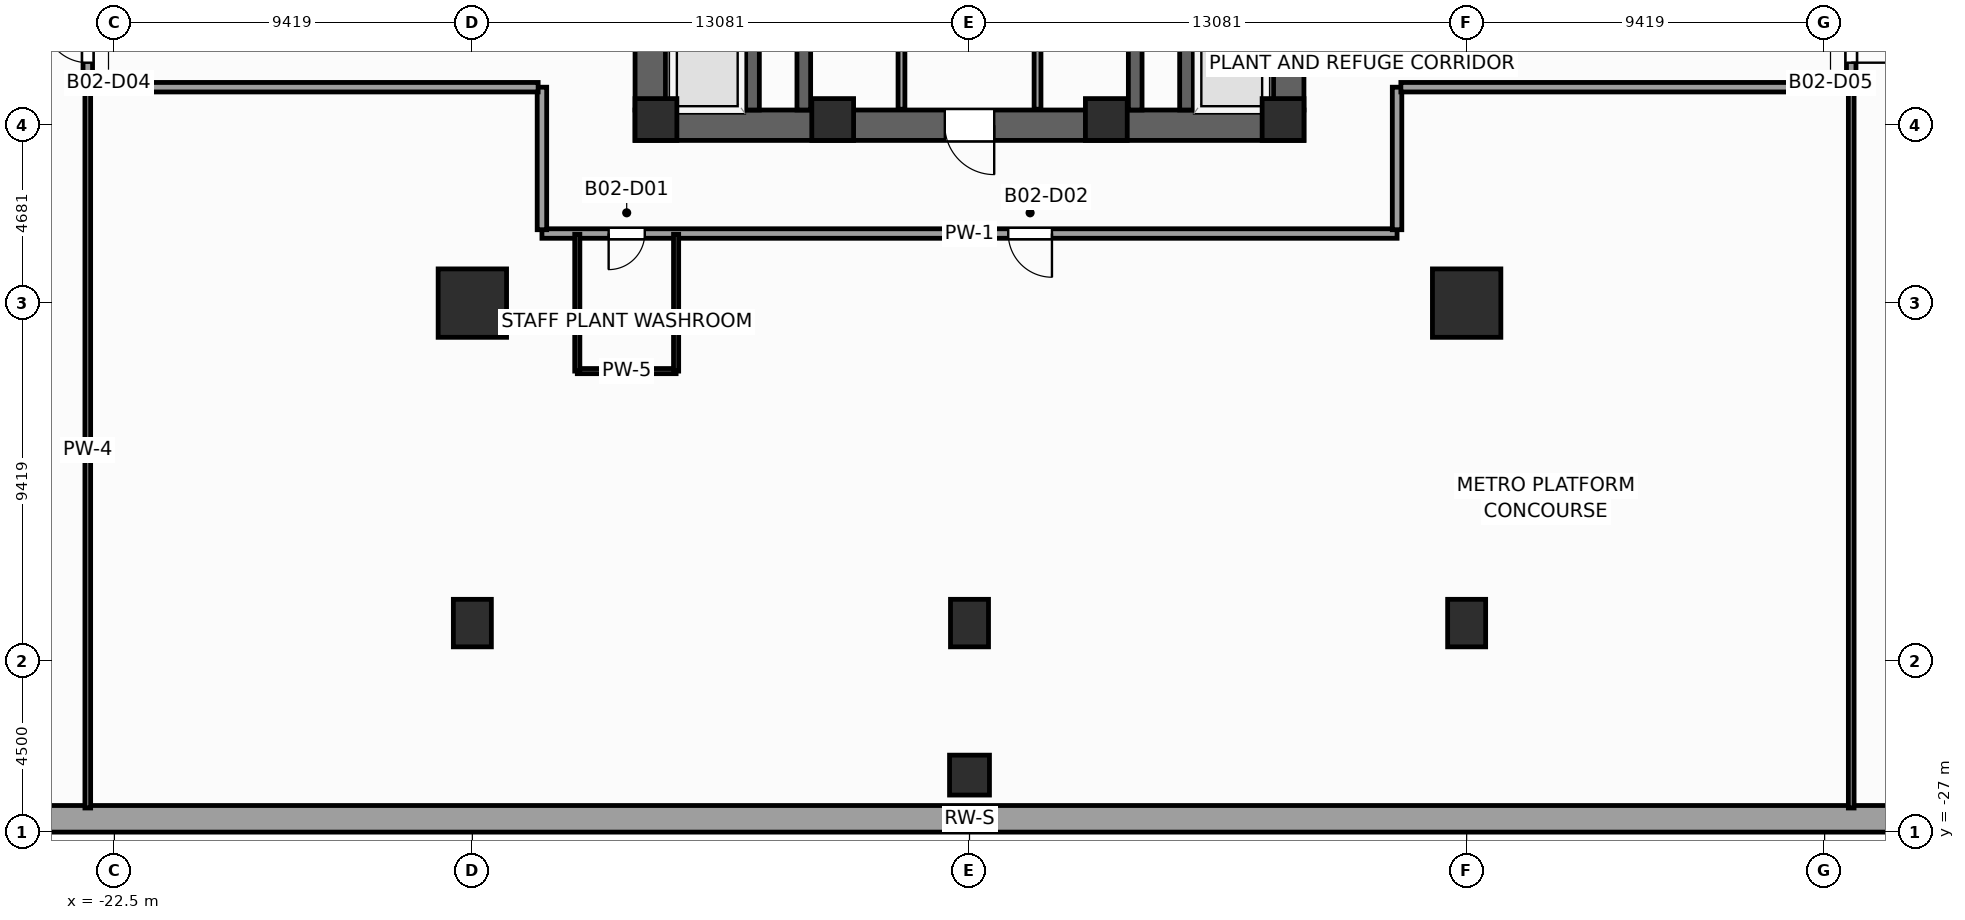
"""IFC4 building model, lengths in metres.
Left out: names, types, materials, properties, quantities, classifications, styles, units other than length and angle.
Written with IfcOpenShell. Run it as: python <this file> out.ifc"""

import sys

from ifc_helpers import new_model, si_unit, direction, frame, frame_2d, origin, origin_2d, place, context, subcontext, project, spatial, rectangle, extrude, source, transform, mapped, element, fill, save


model = new_model("IFC4")
c1 = context("Model", 3, precision=1e-05, world=origin(), true_north=direction((0.0, 1.0)))
c2 = subcontext(c1, "Body", "Model", "MODEL_VIEW")
j1 = project(units=[si_unit("LENGTHUNIT", "METRE"), si_unit("PLANEANGLEUNIT", "RADIAN")], contexts=[c1])
p1 = place(None, origin())
s1 = spatial("IfcSite", under=j1, at=p1, CompositionType="ELEMENT")
p2 = place(p1, origin())
s2 = spatial("IfcBuilding", under=s1, at=p2, CompositionType="ELEMENT")
p3 = place(p2, frame((0.0, 0.0, -9.0)))
s3 = spatial("IfcBuildingStorey", under=s2, at=p3, CompositionType="ELEMENT", Elevation=-9.0)
p4 = place(p3, frame((-8.8, -8.4, 0.0), z_axis=(0.0, 0.0, 1.0), x_axis=(1.0, 0.0, 0.0)))
e1 = element("IfcWall", 1, at=p4, inside=s3, PredefinedType="SHEAR", context=c2, shape_type="SweptSolid", body=[
    extrude(rectangle(XDim=17.6, YDim=0.8, at=frame_2d((8.8, 0.0))), origin(), (0.0, 0.0, 1.0), 4.5),
])
p5 = place(p4, frame((8.15, 0.0, 0.0)))
e2 = element("IfcOpeningElement", 2, at=p5, cuts=e1, PredefinedType="OPENING", context=c2, shape_type="SweptSolid", body=[
    extrude(rectangle(XDim=1.3, YDim=2.2, at=frame_2d((0.65, 1.1))), frame((0.0, 0.41, 0.0), z_axis=(0.0, -1.0, 0.0), x_axis=(1.0, 0.0, 0.0)), (0.0, 0.0, 1.0), 0.82),
])
p6 = place(p3, frame((-8.4, -8.0, 0.0), z_axis=(0.0, 0.0, 1.0), x_axis=(0.0, 1.0, 0.0)))
e3 = element("IfcWall", 3, at=p6, inside=s3, PredefinedType="SHEAR", context=c2, shape_type="SweptSolid", body=[
    extrude(rectangle(XDim=16.0, YDim=0.8, at=frame_2d((8.0, 0.0))), origin(), (0.0, 0.0, 1.0), 4.5),
])
p7 = place(p6, frame((4.69, 0.0, 0.0)))
e4 = element("IfcOpeningElement", 4, at=p7, cuts=e3, PredefinedType="OPENING", context=c2, shape_type="SweptSolid", body=[
    extrude(rectangle(XDim=1.3, YDim=2.2, at=frame_2d((0.65, 1.1))), frame((0.0, 0.41, 0.0), z_axis=(0.0, -1.0, 0.0), x_axis=(1.0, 0.0, 0.0)), (0.0, 0.0, 1.0), 0.82),
])
p8 = place(p3, frame((8.4, -8.0, 0.0), z_axis=(0.0, 0.0, 1.0), x_axis=(0.0, 1.0, 0.0)))
e5 = element("IfcWall", 5, at=p8, inside=s3, PredefinedType="SHEAR", context=c2, shape_type="SweptSolid", body=[
    extrude(rectangle(XDim=16.0, YDim=0.8, at=frame_2d((8.0, 0.0))), origin(), (0.0, 0.0, 1.0), 4.5),
])
p9 = place(p8, frame((4.69, 0.0, 0.0)))
e6 = element("IfcOpeningElement", 6, at=p9, cuts=e5, PredefinedType="OPENING", context=c2, shape_type="SweptSolid", body=[
    extrude(rectangle(XDim=1.3, YDim=2.2, at=frame_2d((0.65, 1.1))), frame((0.0, 0.41, 0.0), z_axis=(0.0, -1.0, 0.0), x_axis=(1.0, 0.0, 0.0)), (0.0, 0.0, 1.0), 0.82),
])
for number, where, z_axis, x_axis in (
    (7, (-4.36, -8.0, 0.0), (0.0, 0.0, 1.0), (0.0, 1.0, 0.0)),
    (8, (4.36, -8.0, 0.0), (0.0, 0.0, 1.0), (0.0, 1.0, 0.0)),
):
    element("IfcWall", number, at=place(p3, frame(where, z_axis=z_axis, x_axis=x_axis)), inside=s3, PredefinedType="SHEAR", context=c2, shape_type="SweptSolid", body=[
        extrude(rectangle(XDim=16.0, YDim=0.36, at=frame_2d((8.0, 0.0))), origin(), (0.0, 0.0, 1.0), 4.5),
    ])
for number, where, z_axis, x_axis in (
    (9, (-5.71, -8.0, 0.0), (0.0, 0.0, 1.0), (0.0, 1.0, 0.0)),
    (10, (5.71, -8.0, 0.0), (0.0, 0.0, 1.0), (0.0, 1.0, 0.0)),
):
    element("IfcWall", number, at=place(p3, frame(where, z_axis=z_axis, x_axis=x_axis)), inside=s3, PredefinedType="SHEAR", context=c2, shape_type="SweptSolid", body=[
        extrude(rectangle(XDim=2.54, YDim=0.36, at=frame_2d((1.27, 0.0))), origin(), (0.0, 0.0, 1.0), 4.5),
    ])
p10 = place(p3, frame((-42.0, -26.65, 0.0), z_axis=(0.0, 0.0, 1.0), x_axis=(1.0, 0.0, 0.0)))
e11 = element("IfcWall", 11, at=p10, inside=s3, PredefinedType="USERDEFINED", context=c2, shape_type="SweptSolid", body=[
    extrude(rectangle(XDim=84.0, YDim=0.7, at=frame_2d((42.0, 0.0))), origin(), (0.0, 0.0, 1.0), 4.5),
])
m1 = source(origin(), c2, "Body", "SweptSolid", [
    extrude(rectangle(XDim=1.1, YDim=1.1, at=origin_2d()), origin(), (0.0, 0.0, 1.0), 4.5),
])
for number, where, z_axis, x_axis in (
    (12, (-8.25, -8.25, 0.0), (0.0, 0.0, 1.0), (1.0, 0.0, 0.0)),
    (13, (8.25, -8.25, 0.0), (0.0, 0.0, 1.0), (1.0, 0.0, 0.0)),
    (14, (-3.6, -8.25, 0.0), (0.0, 0.0, 1.0), (1.0, 0.0, 0.0)),
    (15, (3.6, -8.25, 0.0), (0.0, 0.0, 1.0), (1.0, 0.0, 0.0)),
):
    element("IfcColumn", number, at=place(p3, frame(where, z_axis=z_axis, x_axis=x_axis)), inside=s3, PredefinedType="PILASTER", context=c2, shape_type="MappedRepresentation", body=[
        mapped(m1, transform((0.0, 0.0, 0.0), scale=1.0)),
    ])
m2 = source(origin(), c2, "Body", "SweptSolid", [
    extrude(rectangle(XDim=1.8, YDim=1.8, at=origin_2d()), origin(), (0.0, 0.0, 1.0), 4.5),
])
for number, where, z_axis, x_axis in (
    (16, (-13.081, -13.081, 0.0), (0.0, 0.0, 1.0), (1.0, 0.0, 0.0)),
    (17, (13.081, -13.081, 0.0), (0.0, 0.0, 1.0), (1.0, 0.0, 0.0)),
):
    element("IfcColumn", number, at=place(p3, frame(where, z_axis=z_axis, x_axis=x_axis)), inside=s3, PredefinedType="COLUMN", context=c2, shape_type="MappedRepresentation", body=[
        mapped(m2, transform((0.0, 0.0, 0.0), scale=1.0)),
    ])
m3 = source(origin(), c2, "Body", "SweptSolid", [
    extrude(rectangle(XDim=1.0, YDim=1.25, at=origin_2d()), origin(), (0.0, 0.0, 1.0), 4.5),
])
for number, where, z_axis, x_axis in (
    (18, (-13.081, -21.5, 0.0), (0.0, 0.0, 1.0), (1.0, 0.0, 0.0)),
    (19, (0.0, -21.5, 0.0), (0.0, 0.0, 1.0), (1.0, 0.0, 0.0)),
    (20, (13.081, -21.5, 0.0), (0.0, 0.0, 1.0), (1.0, 0.0, 0.0)),
):
    element("IfcColumn", number, at=place(p3, frame(where, z_axis=z_axis, x_axis=x_axis)), inside=s3, PredefinedType="COLUMN", context=c2, shape_type="MappedRepresentation", body=[
        mapped(m3, transform((0.0, 0.0, 0.0), scale=1.0)),
    ])
m4 = source(origin(), c2, "Body", "SweptSolid", [
    extrude(rectangle(XDim=1.05, YDim=1.05, at=origin_2d()), origin(), (0.0, 0.0, 1.0), 4.5),
])
p11 = place(p3, frame((0.0, -25.5, 0.0), z_axis=(0.0, 0.0, 1.0), x_axis=(1.0, 0.0, 0.0)))
e21 = element("IfcColumn", 21, at=p11, inside=s3, PredefinedType="COLUMN", context=c2, shape_type="MappedRepresentation", body=[
    mapped(m4, transform((0.0, 0.0, 0.0), scale=1.0)),
])
for number, where, z_axis, x_axis in (
    (22, (-1.79, -7.98, 0.0), (0.0, 0.0, 1.0), (0.0, 1.0, 0.0)),
    (23, (1.79, -7.98, 0.0), (0.0, 0.0, 1.0), (0.0, 1.0, 0.0)),
):
    element("IfcWall", number, at=place(p3, frame(where, z_axis=z_axis, x_axis=x_axis)), inside=s3, PredefinedType="PARTITIONING", context=c2, shape_type="SweptSolid", body=[
        extrude(rectangle(XDim=12.38, YDim=0.18, at=frame_2d((6.19, 0.0))), origin(), (0.0, 0.0, 1.0), 4.18),
    ])
p12 = place(p3, frame((-11.25, -11.25, 0.0), z_axis=(0.0, 0.0, 1.0), x_axis=(1.0, 0.0, 0.0)))
e24 = element("IfcWall", 24, at=p12, inside=s3, PredefinedType="PARTITIONING", context=c2, shape_type="SweptSolid", body=[
    extrude(rectangle(XDim=22.5, YDim=0.25, at=frame_2d((11.25, 0.0))), origin(), (0.0, 0.0, 1.0), 4.18),
])
p13 = place(p12, frame((1.755, 0.0, 0.0)))
e25 = element("IfcOpeningElement", 25, at=p13, cuts=e24, PredefinedType="OPENING", context=c2, shape_type="SweptSolid", body=[
    extrude(rectangle(XDim=0.95, YDim=2.1, at=frame_2d((0.475, 1.05))), frame((0.0, 0.135, 0.0), z_axis=(0.0, -1.0, 0.0), x_axis=(1.0, 0.0, 0.0)), (0.0, 0.0, 1.0), 0.27),
])
p14 = place(p12, frame((12.27, 0.0, 0.0)))
e26 = element("IfcOpeningElement", 26, at=p14, cuts=e24, PredefinedType="OPENING", context=c2, shape_type="SweptSolid", body=[
    extrude(rectangle(XDim=1.15, YDim=2.25, at=frame_2d((0.575, 1.125))), frame((0.0, 0.135, 0.0), z_axis=(0.0, -1.0, 0.0), x_axis=(1.0, 0.0, 0.0)), (0.0, 0.0, 1.0), 0.27),
])
for number, where, z_axis, x_axis in (
    (27, (-11.25, -11.15, 0.0), (0.0, 0.0, 1.0), (0.0, 1.0, 0.0)),
    (28, (11.25, -11.15, 0.0), (0.0, 0.0, 1.0), (0.0, 1.0, 0.0)),
):
    element("IfcWall", number, at=place(p3, frame(where, z_axis=z_axis, x_axis=x_axis)), inside=s3, PredefinedType="PARTITIONING", context=c2, shape_type="SweptSolid", body=[
        extrude(rectangle(XDim=3.75, YDim=0.25, at=frame_2d((1.875, 0.0))), origin(), (0.0, 0.0, 1.0), 4.18),
    ])
for number, where, z_axis, x_axis in (
    (29, (-23.2, -7.4, 0.0), (0.0, 0.0, 1.0), (1.0, 0.0, 0.0)),
    (30, (11.35, -7.4, 0.0), (0.0, 0.0, 1.0), (1.0, 0.0, 0.0)),
):
    element("IfcWall", number, at=place(p3, frame(where, z_axis=z_axis, x_axis=x_axis)), inside=s3, PredefinedType="PARTITIONING", context=c2, shape_type="SweptSolid", body=[
        extrude(rectangle(XDim=11.85, YDim=0.25, at=frame_2d((5.925, 0.0))), origin(), (0.0, 0.0, 1.0), 4.18),
    ])
p15 = place(p3, frame((-23.2, -7.4, 0.0), z_axis=(0.0, 0.0, 1.0), x_axis=(0.0, 1.0, 0.0)))
e31 = element("IfcWall", 31, at=p15, inside=s3, PredefinedType="PARTITIONING", context=c2, shape_type="SweptSolid", body=[
    extrude(rectangle(XDim=2.44, YDim=0.25, at=frame_2d((1.22, 0.0))), origin(), (0.0, 0.0, 1.0), 4.18),
])
p16 = place(p15, frame((0.645, 0.0, 0.0)))
e32 = element("IfcOpeningElement", 32, at=p16, cuts=e31, PredefinedType="OPENING", context=c2, shape_type="SweptSolid", body=[
    extrude(rectangle(XDim=1.15, YDim=2.25, at=frame_2d((0.575, 1.125))), frame((0.0, 0.135, 0.0), z_axis=(0.0, -1.0, 0.0), x_axis=(1.0, 0.0, 0.0)), (0.0, 0.0, 1.0), 0.27),
])
p17 = place(p3, frame((23.2, -7.4, 0.0), z_axis=(0.0, 0.0, 1.0), x_axis=(0.0, 1.0, 0.0)))
e33 = element("IfcWall", 33, at=p17, inside=s3, PredefinedType="PARTITIONING", context=c2, shape_type="SweptSolid", body=[
    extrude(rectangle(XDim=2.44, YDim=0.25, at=frame_2d((1.22, 0.0))), origin(), (0.0, 0.0, 1.0), 4.18),
])
p18 = place(p17, frame((0.645, 0.0, 0.0)))
e34 = element("IfcOpeningElement", 34, at=p18, cuts=e33, PredefinedType="OPENING", context=c2, shape_type="SweptSolid", body=[
    extrude(rectangle(XDim=1.15, YDim=2.25, at=frame_2d((0.575, 1.125))), frame((0.0, 0.135, 0.0), z_axis=(0.0, -1.0, 0.0), x_axis=(1.0, 0.0, 0.0)), (0.0, 0.0, 1.0), 0.27),
])
for number, where, z_axis, x_axis in (
    (35, (-23.2, -26.365, 0.0), (0.0, 0.0, 1.0), (0.0, 1.0, 0.0)),
    (36, (23.2, -26.365, 0.0), (0.0, 0.0, 1.0), (0.0, 1.0, 0.0)),
):
    element("IfcWall", number, at=place(p3, frame(where, z_axis=z_axis, x_axis=x_axis)), inside=s3, PredefinedType="PARTITIONING", context=c2, shape_type="SweptSolid", body=[
        extrude(rectangle(XDim=18.835, YDim=0.15, at=frame_2d((9.417, 0.0))), origin(), (0.0, 0.0, 1.0), 4.18),
    ])
p19 = place(p3, frame((-10.32, -14.87, 0.0), z_axis=(0.0, 0.0, 1.0), x_axis=(1.0, 0.0, 0.0)))
e37 = element("IfcWall", 37, at=p19, inside=s3, PredefinedType="PARTITIONING", context=c2, shape_type="SweptSolid", body=[
    extrude(rectangle(XDim=2.6, YDim=0.135, at=frame_2d((1.3, 0.0))), origin(), (0.0, 0.0, 1.0), 4.18),
])
for number, where, z_axis, x_axis in (
    (38, (-7.72, -14.87, 0.0), (0.0, 0.0, 1.0), (0.0, 1.0, 0.0)),
    (39, (-10.32, -14.87, 0.0), (0.0, 0.0, 1.0), (0.0, 1.0, 0.0)),
):
    element("IfcWall", number, at=place(p3, frame(where, z_axis=z_axis, x_axis=x_axis)), inside=s3, PredefinedType="PARTITIONING", context=c2, shape_type="SweptSolid", body=[
        extrude(rectangle(XDim=3.6, YDim=0.135, at=frame_2d((1.8, 0.0))), origin(), (0.0, 0.0, 1.0), 4.18),
    ])
m5 = source(origin(), c2, "Body", "SweptSolid", [
    extrude(rectangle(XDim=1.3, YDim=2.2, at=frame_2d((0.65, 1.1))), frame((0.0, 0.025, 0.0), z_axis=(0.0, -1.0, 0.0), x_axis=(1.0, 0.0, 0.0)), (0.0, 0.0, 1.0), 0.05),
])
p20 = place(p5, frame((1.3, 0.0, 0.0), z_axis=(0.0, 0.0, 1.0), x_axis=(-1.0, 0.0, 0.0)))
e40 = element("IfcDoor", 40, at=p20, inside=s3, OperationType="SINGLE_SWING_RIGHT", PredefinedType="DOOR", context=c2, shape_type="MappedRepresentation", body=[
    mapped(m5, transform((0.0, 0.0, 0.0), scale=1.0)),
])
fill(e2, e40)
m6 = source(origin(), c2, "Body", "SweptSolid", [
    extrude(rectangle(XDim=0.95, YDim=2.1, at=frame_2d((0.475, 1.05))), frame((0.0, 0.025, 0.0), z_axis=(0.0, -1.0, 0.0), x_axis=(1.0, 0.0, 0.0)), (0.0, 0.0, 1.0), 0.05),
])
p21 = place(p13, frame((0.95, 0.0, 0.0), z_axis=(0.0, 0.0, 1.0), x_axis=(-1.0, 0.0, 0.0)))
e41 = element("IfcDoor", 41, at=p21, inside=s3, OperationType="SINGLE_SWING_LEFT", PredefinedType="DOOR", context=c2, shape_type="MappedRepresentation", body=[
    mapped(m6, transform((0.0, 0.0, 0.0), scale=1.0)),
])
fill(e25, e41)
m7 = source(origin(), c2, "Body", "SweptSolid", [
    extrude(rectangle(XDim=1.15, YDim=2.25, at=frame_2d((0.575, 1.125))), frame((0.0, 0.025, 0.0), z_axis=(0.0, -1.0, 0.0), x_axis=(1.0, 0.0, 0.0)), (0.0, 0.0, 1.0), 0.05),
])
p22 = place(p14, frame((1.15, 0.0, 0.0), z_axis=(0.0, 0.0, 1.0), x_axis=(-1.0, 0.0, 0.0)))
e42 = element("IfcDoor", 42, at=p22, inside=s3, OperationType="SINGLE_SWING_RIGHT", PredefinedType="DOOR", context=c2, shape_type="MappedRepresentation", body=[
    mapped(m7, transform((0.0, 0.0, 0.0), scale=1.0)),
])
fill(e26, e42)
p23 = place(p16, origin())
e43 = element("IfcDoor", 43, at=p23, inside=s3, OperationType="SINGLE_SWING_RIGHT", PredefinedType="DOOR", context=c2, shape_type="MappedRepresentation", body=[
    mapped(m7, transform((0.0, 0.0, 0.0), scale=1.0)),
])
fill(e32, e43)
p24 = place(p18, frame((1.15, 0.0, 0.0), z_axis=(0.0, 0.0, 1.0), x_axis=(-1.0, 0.0, 0.0)))
e44 = element("IfcDoor", 44, at=p24, inside=s3, OperationType="SINGLE_SWING_LEFT", PredefinedType="DOOR", context=c2, shape_type="MappedRepresentation", body=[
    mapped(m7, transform((0.0, 0.0, 0.0), scale=1.0)),
])
fill(e34, e44)
save(model, sys.argv[1])
